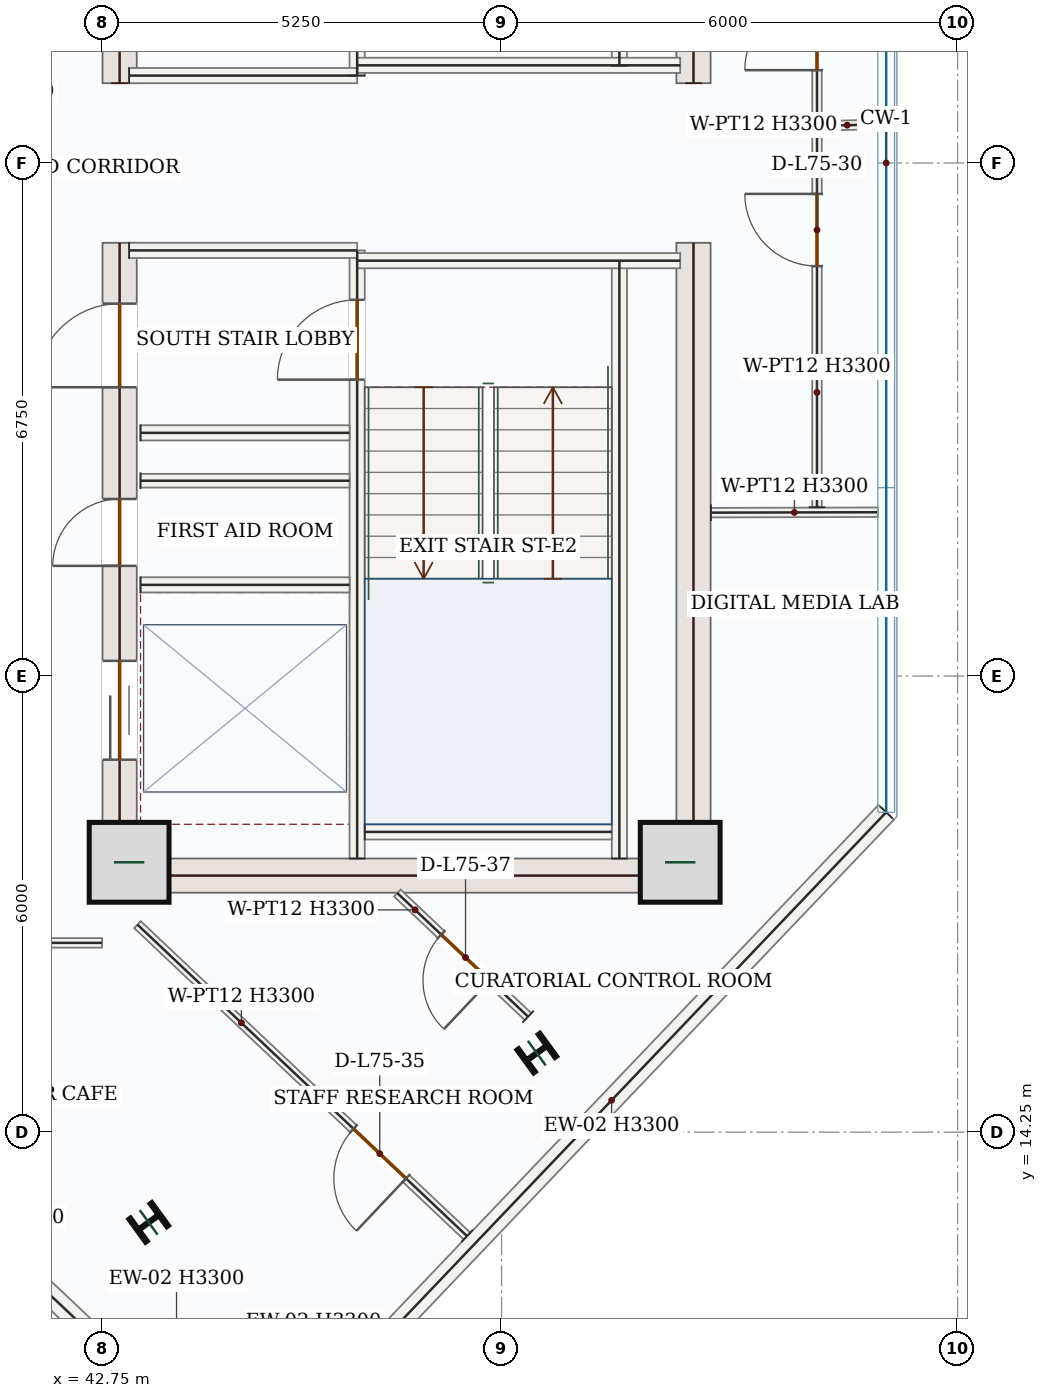
"""IFC4 building model, lengths in metres.
Left out: names, types, materials, properties, quantities, classifications, styles, units other than length and angle.
Written with IfcOpenShell. Run it as: python <this file> out.ifc"""

import sys

from ifc_helpers import new_model, si_unit, direction, frame, frame_2d, origin, origin_2d, place, context, subcontext, project, spatial, rectangle, i_section, extrude, source, transform, mapped, element, fill, save


model = new_model("IFC4")
c1 = context("Model", 3, precision=1e-05, world=origin(), true_north=direction((0.0, 1.0)))
c2 = subcontext(c1, "Body", "Model", "MODEL_VIEW")
j1 = project(units=[si_unit("LENGTHUNIT", "METRE"), si_unit("PLANEANGLEUNIT", "RADIAN")], contexts=[c1])
p1 = place(None, origin())
s1 = spatial("IfcSite", under=j1, at=p1, CompositionType="ELEMENT")
p2 = place(p1, origin())
s2 = spatial("IfcBuilding", under=s1, at=p2, CompositionType="ELEMENT")
p3 = place(p2, frame((0.0, 0.0, 310.35)))
s3 = spatial("IfcBuildingStorey", under=s2, at=p3, CompositionType="ELEMENT", Elevation=310.35)
p4 = place(p3, frame((42.975, 17.4, 0.0), z_axis=(0.0, 0.0, 1.0), x_axis=(0.0, 1.0, 0.0)))
e1 = element("IfcWall", 1, at=p4, inside=s3, PredefinedType="SHEAR", context=c2, shape_type="SweptSolid", body=[
    extrude(rectangle(XDim=8.55, YDim=0.45, at=frame_2d((4.275, 0.0))), origin(), (0.0, 0.0, 1.0), 3.3),
])
p5 = place(p4, frame((6.65, 0.0, 0.0)))
e2 = element("IfcOpeningElement", 2, at=p5, cuts=e1, PredefinedType="OPENING", context=c2, shape_type="SweptSolid", body=[
    extrude(rectangle(XDim=1.1, YDim=2.2, at=frame_2d((0.55, 1.1))), frame((0.0, 0.235, 0.0), z_axis=(0.0, -1.0, 0.0), x_axis=(1.0, 0.0, 0.0)), (0.0, 0.0, 1.0), 0.47),
])
p6 = place(p4, frame((1.75, 0.0, 0.0)))
e3 = element("IfcOpeningElement", 3, at=p6, cuts=e1, PredefinedType="OPENING", context=c2, shape_type="SweptSolid", body=[
    extrude(rectangle(XDim=1.3, YDim=2.2, at=frame_2d((0.65, 1.1))), frame((0.0, 0.235, 0.0), z_axis=(0.0, -1.0, 0.0), x_axis=(1.0, 0.0, 0.0)), (0.0, 0.0, 1.0), 0.47),
])
p7 = place(p4, frame((4.3, 0.0, 0.0)))
e4 = element("IfcOpeningElement", 4, at=p7, cuts=e1, PredefinedType="OPENING", context=c2, shape_type="SweptSolid", body=[
    extrude(rectangle(XDim=0.88, YDim=2.1, at=frame_2d((0.44, 1.05))), frame((0.0, 0.235, 0.0), z_axis=(0.0, -1.0, 0.0), x_axis=(1.0, 0.0, 0.0)), (0.0, 0.0, 1.0), 0.47),
])
p8 = place(p3, frame((42.975, 28.05, 0.0), z_axis=(0.0, 0.0, 1.0), x_axis=(0.0, 1.0, 0.0)))
e5 = element("IfcWall", 5, at=p8, inside=s3, PredefinedType="SHEAR", context=c2, shape_type="SweptSolid", body=[
    extrude(rectangle(XDim=8.55, YDim=0.45, at=frame_2d((4.275, 0.0))), origin(), (0.0, 0.0, 1.0), 3.3),
])
p9 = place(p8, frame((1.5, 0.0, 0.0)))
e6 = element("IfcOpeningElement", 6, at=p9, cuts=e5, PredefinedType="OPENING", context=c2, shape_type="SweptSolid", body=[
    extrude(rectangle(XDim=1.1, YDim=2.2, at=frame_2d((0.55, 1.1))), frame((0.0, 0.235, 0.0), z_axis=(0.0, -1.0, 0.0), x_axis=(1.0, 0.0, 0.0)), (0.0, 0.0, 1.0), 0.47),
])
m1 = source(origin(), c2, "Body", "SweptSolid", [
    extrude(rectangle(XDim=8.55, YDim=0.45, at=frame_2d((4.275, 0.0))), origin(), (0.0, 0.0, 1.0), 3.3),
])
for number, where, z_axis, x_axis in (
    (7, (50.525, 17.4, 0.0), (0.0, 0.0, 1.0), (0.0, 1.0, 0.0)),
    (8, (50.525, 28.05, 0.0), (0.0, 0.0, 1.0), (0.0, 1.0, 0.0)),
):
    element("IfcWall", number, at=place(p3, frame(where, z_axis=z_axis, x_axis=x_axis)), inside=s3, PredefinedType="SHEAR", context=c2, shape_type="MappedRepresentation", body=[
        mapped(m1, transform((0.0, 0.0, 0.0), x_axis=(1.0, 0.0, 0.0), y_axis=(0.0, 1.0, 0.0), z_axis=(0.0, 0.0, 1.0), scale=1.0)),
    ])
m2 = source(origin(), c2, "Body", "SweptSolid", [
    extrude(rectangle(XDim=7.1, YDim=0.45, at=frame_2d((3.55, 0.0))), origin(), (0.0, 0.0, 1.0), 3.3),
])
p10 = place(p3, frame((43.2, 17.625, 0.0), z_axis=(0.0, 0.0, 1.0), x_axis=(1.0, 0.0, 0.0)))
e9 = element("IfcWall", 9, at=p10, inside=s3, PredefinedType="SHEAR", context=c2, shape_type="MappedRepresentation", body=[
    mapped(m2, transform((0.0, 0.0, 0.0), x_axis=(1.0, 0.0, 0.0), y_axis=(0.0, 1.0, 0.0), z_axis=(0.0, 0.0, 1.0), scale=1.0)),
])
m3 = source(origin(), c2, "Body", "SweptSolid", [
    extrude(rectangle(XDim=1.05, YDim=1.05, at=origin_2d()), origin(), (0.0, 0.0, 1.0), 3.75),
])
for number, where, z_axis, x_axis in (
    (10, (43.1, 17.8, 0.0), (0.0, 0.0, 1.0), (1.0, 0.0, 0.0)),
    (11, (50.35, 17.8, 0.0), (0.0, 0.0, 1.0), (1.0, 0.0, 0.0)),
):
    element("IfcColumn", number, at=place(p3, frame(where, z_axis=z_axis, x_axis=x_axis)), inside=s3, PredefinedType="COLUMN", context=c2, shape_type="MappedRepresentation", body=[
        mapped(m3, transform((0.0, 0.0, 0.0), x_axis=(1.0, 0.0, 0.0), y_axis=(0.0, 1.0, 0.0), z_axis=(0.0, 0.0, 1.0), scale=1.0)),
    ])
m4 = source(origin(), c2, "Body", "SweptSolid", [
    extrude(i_section(OverallWidth=0.374, OverallDepth=0.372, WebThickness=0.016, FlangeThickness=0.026, FilletRadius=0.018, at=origin_2d()), origin(), (0.0, 0.0, 1.0), 3.75),
])
for number, where, z_axis, x_axis in (
    (12, (43.357, 13.063, 0.0), (0.0, 0.0, 1.0), (-0.588, 0.809, 0.0)),
    (13, (48.464, 15.289, 0.0), (0.0, 0.0, 1.0), (-0.588, 0.809, 0.0)),
):
    element("IfcColumn", number, at=place(p3, frame(where, z_axis=z_axis, x_axis=x_axis)), inside=s3, PredefinedType="COLUMN", context=c2, shape_type="MappedRepresentation", body=[
        mapped(m4, transform((0.0, 0.0, 0.0), x_axis=(1.0, 0.0, 0.0), y_axis=(0.0, 1.0, 0.0), z_axis=(0.0, 0.0, 1.0), scale=1.0)),
    ])
m5 = source(origin(), c2, "Body", "SweptSolid", [
    extrude(rectangle(XDim=10.47, YDim=0.28, at=frame_2d((5.235, 0.0))), origin(), (0.0, 0.0, 1.0), 3.3),
])
p11 = place(p3, frame((53.06, 18.458, 0.0), z_axis=(0.0, 0.0, 1.0), x_axis=(-0.690070788875, -0.723741878256, 0.0)))
e14 = element("IfcWall", 14, at=p11, inside=s3, PredefinedType="SOLIDWALL", context=c2, shape_type="MappedRepresentation", body=[
    mapped(m5, transform((0.0, 0.0, 0.0), x_axis=(1.0, 0.0, 0.0), y_axis=(0.0, 1.0, 0.0), z_axis=(0.0, 0.0, 1.0), scale=1.0)),
])
m6 = source(origin(), c2, "Body", "SweptSolid", [
    extrude(rectangle(XDim=5.718, YDim=0.28, at=frame_2d((2.859, 0.0))), origin(), (0.0, 0.0, 1.0), 3.3),
])
p12 = place(p3, frame((43.432, 10.812, 0.0), z_axis=(0.0, 0.0, 1.0), x_axis=(-0.726765623086, 0.686885528382, 0.0)))
e15 = element("IfcWall", 15, at=p12, inside=s3, PredefinedType="SOLIDWALL", context=c2, shape_type="MappedRepresentation", body=[
    mapped(m6, transform((0.0, 0.0, 0.0), x_axis=(1.0, 0.0, 0.0), y_axis=(0.0, 1.0, 0.0), z_axis=(0.0, 0.0, 1.0), scale=1.0)),
])
m7 = source(origin(), c2, "Body", "SweptSolid", [
    extrude(rectangle(XDim=7.87, YDim=0.2, at=frame_2d((3.935, 0.0))), origin(), (0.0, 0.0, 1.0), 3.3),
])
for number, where, z_axis, x_axis in (
    (16, (49.55, 17.85, 0.0), (0.0, 0.0, 1.0), (0.0, 1.0, 0.0)),
    (17, (49.55, 28.28, 0.0), (0.0, 0.0, 1.0), (0.0, 1.0, 0.0)),
):
    element("IfcWall", number, at=place(p3, frame(where, z_axis=z_axis, x_axis=x_axis)), inside=s3, PredefinedType="SOLIDWALL", context=c2, shape_type="MappedRepresentation", body=[
        mapped(m7, transform((0.0, 0.0, 0.0), x_axis=(1.0, 0.0, 0.0), y_axis=(0.0, 1.0, 0.0), z_axis=(0.0, 0.0, 1.0), scale=1.0)),
    ])
p13 = place(p3, frame((46.1, 17.85, 0.0), z_axis=(0.0, 0.0, 1.0), x_axis=(0.0, 1.0, 0.0)))
e18 = element("IfcWall", 18, at=p13, inside=s3, PredefinedType="SOLIDWALL", context=c2, shape_type="SweptSolid", body=[
    extrude(rectangle(XDim=8.0, YDim=0.2, at=frame_2d((4.0, 0.0))), origin(), (0.0, 0.0, 1.0), 3.3),
])
p14 = place(p13, frame((6.3, 0.0, 0.0)))
e19 = element("IfcOpeningElement", 19, at=p14, cuts=e18, PredefinedType="OPENING", context=c2, shape_type="SweptSolid", body=[
    extrude(rectangle(XDim=1.05, YDim=2.15, at=frame_2d((0.525, 1.075))), frame((0.0, 0.11, 0.0), z_axis=(0.0, -1.0, 0.0), x_axis=(1.0, 0.0, 0.0)), (0.0, 0.0, 1.0), 0.22),
])
p15 = place(p3, frame((46.1, 28.15, 0.0), z_axis=(0.0, 0.0, 1.0), x_axis=(0.0, 1.0, 0.0)))
e20 = element("IfcWall", 20, at=p15, inside=s3, PredefinedType="SOLIDWALL", context=c2, shape_type="SweptSolid", body=[
    extrude(rectangle(XDim=8.0, YDim=0.2, at=frame_2d((4.0, 0.0))), origin(), (0.0, 0.0, 1.0), 3.3),
])
p16 = place(p15, frame((0.4, 0.0, 0.0)))
e21 = element("IfcOpeningElement", 21, at=p16, cuts=e20, PredefinedType="OPENING", context=c2, shape_type="SweptSolid", body=[
    extrude(rectangle(XDim=1.05, YDim=2.15, at=frame_2d((0.525, 1.075))), frame((0.0, 0.11, 0.0), z_axis=(0.0, -1.0, 0.0), x_axis=(1.0, 0.0, 0.0)), (0.0, 0.0, 1.0), 0.22),
])
m8 = source(origin(), c2, "Body", "SweptSolid", [
    extrude(rectangle(XDim=3.0, YDim=0.2, at=frame_2d((1.5, 0.0))), origin(), (0.0, 0.0, 1.0), 3.3),
])
p17 = place(p3, frame((43.1, 25.85, 0.0), z_axis=(0.0, 0.0, 1.0), x_axis=(1.0, 0.0, 0.0)))
e22 = element("IfcWall", 22, at=p17, inside=s3, PredefinedType="SOLIDWALL", context=c2, shape_type="MappedRepresentation", body=[
    mapped(m8, transform((0.0, 0.0, 0.0), x_axis=(1.0, 0.0, 0.0), y_axis=(0.0, 1.0, 0.0), z_axis=(0.0, 0.0, 1.0), scale=1.0)),
])
m9 = source(origin(), c2, "Body", "SweptSolid", [
    extrude(rectangle(XDim=4.25, YDim=0.2, at=frame_2d((2.125, 0.0))), origin(), (0.0, 0.0, 1.0), 3.3),
])
p18 = place(p3, frame((46.1, 25.715, 0.0), z_axis=(0.0, 0.0, 1.0), x_axis=(1.0, 0.0, 0.0)))
e23 = element("IfcWall", 23, at=p18, inside=s3, PredefinedType="SOLIDWALL", context=c2, shape_type="MappedRepresentation", body=[
    mapped(m9, transform((0.0, 0.0, 0.0), x_axis=(1.0, 0.0, 0.0), y_axis=(0.0, 1.0, 0.0), z_axis=(0.0, 0.0, 1.0), scale=1.0)),
])
p19 = place(p3, frame((43.1, 28.15, 0.0), z_axis=(0.0, 0.0, 1.0), x_axis=(1.0, 0.0, 0.0)))
e24 = element("IfcWall", 24, at=p19, inside=s3, PredefinedType="SOLIDWALL", context=c2, shape_type="MappedRepresentation", body=[
    mapped(m8, transform((0.0, 0.0, 0.0), x_axis=(1.0, 0.0, 0.0), y_axis=(0.0, 1.0, 0.0), z_axis=(0.0, 0.0, 1.0), scale=1.0)),
])
p20 = place(p3, frame((46.1, 28.285, 0.0), z_axis=(0.0, 0.0, 1.0), x_axis=(1.0, 0.0, 0.0)))
e25 = element("IfcWall", 25, at=p20, inside=s3, PredefinedType="SOLIDWALL", context=c2, shape_type="MappedRepresentation", body=[
    mapped(m9, transform((0.0, 0.0, 0.0), x_axis=(1.0, 0.0, 0.0), y_axis=(0.0, 1.0, 0.0), z_axis=(0.0, 0.0, 1.0), scale=1.0)),
])
m10 = source(origin(), c2, "Body", "SweptSolid", [
    extrude(rectangle(XDim=3.25, YDim=0.2, at=frame_2d((1.625, 0.0))), origin(), (0.0, 0.0, 1.0), 3.3),
])
p21 = place(p3, frame((46.2, 18.2, 0.0), z_axis=(0.0, 0.0, 1.0), x_axis=(1.0, 0.0, 0.0)))
e26 = element("IfcWall", 26, at=p21, inside=s3, PredefinedType="SOLIDWALL", context=c2, shape_type="MappedRepresentation", body=[
    mapped(m10, transform((0.0, 0.0, 0.0), x_axis=(1.0, 0.0, 0.0), y_axis=(0.0, 1.0, 0.0), z_axis=(0.0, 0.0, 1.0), scale=1.0)),
])
m11 = source(origin(), c2, "Body", "SweptSolid", [
    extrude(rectangle(XDim=2.75, YDim=0.2, at=frame_2d((1.375, 0.0))), origin(), (0.0, 0.0, 1.0), 3.3),
])
for number, where, z_axis, x_axis in (
    (27, (43.25, 23.45, 0.0), (0.0, 0.0, 1.0), (1.0, 0.0, 0.0)),
    (28, (43.25, 21.45, 0.0), (0.0, 0.0, 1.0), (1.0, 0.0, 0.0)),
):
    element("IfcWall", number, at=place(p3, frame(where, z_axis=z_axis, x_axis=x_axis)), inside=s3, PredefinedType="SOLIDWALL", context=c2, shape_type="MappedRepresentation", body=[
        mapped(m11, transform((0.0, 0.0, 0.0), x_axis=(1.0, 0.0, 0.0), y_axis=(0.0, 1.0, 0.0), z_axis=(0.0, 0.0, 1.0), scale=1.0)),
    ])
m12 = source(origin(), c2, "Body", "SweptSolid", [
    extrude(rectangle(XDim=2.75, YDim=0.18, at=frame_2d((1.375, 0.0))), origin(), (0.0, 0.0, 1.0), 3.3),
])
p22 = place(p3, frame((43.25, 22.82, 0.0), z_axis=(0.0, 0.0, 1.0), x_axis=(1.0, 0.0, 0.0)))
e29 = element("IfcWall", 29, at=p22, inside=s3, PredefinedType="PARTITIONING", context=c2, shape_type="MappedRepresentation", body=[
    mapped(m12, transform((0.0, 0.0, 0.0), x_axis=(1.0, 0.0, 0.0), y_axis=(0.0, 1.0, 0.0), z_axis=(0.0, 0.0, 1.0), scale=1.0)),
])
p23 = place(p3, frame((48.349, 15.769, 0.0), z_axis=(0.0, 0.0, 1.0), x_axis=(-0.726735597886, 0.686917295433, 0.0)))
e30 = element("IfcWall", 30, at=p23, inside=s3, PredefinedType="PARTITIONING", context=c2, shape_type="SweptSolid", body=[
    extrude(rectangle(XDim=2.367, YDim=0.125, at=frame_2d((1.183, 0.0))), origin(), (0.0, 0.0, 1.0), 3.3),
])
p24 = place(p23, frame((0.692, 0.0, 0.0)))
e31 = element("IfcOpeningElement", 31, at=p24, cuts=e30, PredefinedType="OPENING", context=c2, shape_type="SweptSolid", body=[
    extrude(rectangle(XDim=0.88, YDim=2.1, at=frame_2d((0.44, 1.05))), frame((0.0, 0.073, 0.0), z_axis=(0.0, -1.0, 0.0), x_axis=(1.0, 0.0, 0.0)), (0.0, 0.0, 1.0), 0.145),
])
p25 = place(p3, frame((47.544, 12.883, 0.0), z_axis=(0.0, 0.0, 1.0), x_axis=(-0.726761082497, 0.686890332562, 0.0)))
e32 = element("IfcWall", 32, at=p25, inside=s3, PredefinedType="PARTITIONING", context=c2, shape_type="SweptSolid", body=[
    extrude(rectangle(XDim=5.964, YDim=0.125, at=frame_2d((2.982, 0.0))), origin(), (0.0, 0.0, 1.0), 3.3),
])
p26 = place(p25, frame((1.103, 0.0, 0.0)))
e33 = element("IfcOpeningElement", 33, at=p26, cuts=e32, PredefinedType="OPENING", context=c2, shape_type="SweptSolid", body=[
    extrude(rectangle(XDim=0.95, YDim=2.15, at=frame_2d((0.475, 1.075))), frame((0.0, 0.073, 0.0), z_axis=(0.0, -1.0, 0.0), x_axis=(1.0, 0.0, 0.0)), (0.0, 0.0, 1.0), 0.145),
])
m13 = source(origin(), c2, "Body", "SweptSolid", [
    extrude(rectangle(XDim=2.195, YDim=0.125, at=frame_2d((1.098, 0.0))), origin(), (0.0, 0.0, 1.0), 3.3),
])
p27 = place(p3, frame((50.755, 22.4, 0.0), z_axis=(0.0, 0.0, 1.0), x_axis=(0.999997006375, 0.002446884011, 0.0)))
e34 = element("IfcWall", 34, at=p27, inside=s3, PredefinedType="PARTITIONING", context=c2, shape_type="MappedRepresentation", body=[
    mapped(m13, transform((0.0, 0.0, 0.0), x_axis=(1.0, 0.0, 0.0), y_axis=(0.0, 1.0, 0.0), z_axis=(0.0, 0.0, 1.0), scale=1.0)),
])
p28 = place(p3, frame((52.149, 22.471, 0.0), z_axis=(0.0, 0.0, 1.0), x_axis=(9.7318865e-05, 0.999999995265, 0.0)))
e35 = element("IfcWall", 35, at=p28, inside=s3, PredefinedType="PARTITIONING", context=c2, shape_type="SweptSolid", body=[
    extrude(rectangle(XDim=5.017, YDim=0.125, at=frame_2d((2.509, 0.0))), origin(), (0.0, 0.0, 1.0), 3.3),
])
p29 = place(p28, frame((3.173, 0.0, 0.0)))
e36 = element("IfcOpeningElement", 36, at=p29, cuts=e35, PredefinedType="OPENING", context=c2, shape_type="SweptSolid", body=[
    extrude(rectangle(XDim=0.95, YDim=2.15, at=frame_2d((0.475, 1.075))), frame((0.0, 0.073, 0.0), z_axis=(0.0, -1.0, 0.0), x_axis=(1.0, 0.0, 0.0)), (0.0, 0.0, 1.0), 0.145),
])
m14 = source(origin(), c2, "Body", "SweptSolid", [
    extrude(rectangle(XDim=0.795, YDim=0.125, at=frame_2d((0.398, 0.0))), origin(), (0.0, 0.0, 1.0), 3.3),
])
p30 = place(p3, frame((52.15, 27.488, 0.0), z_axis=(0.0, 0.0, 1.0), x_axis=(0.999727865024, 0.023328006675, 0.0)))
e37 = element("IfcWall", 37, at=p30, inside=s3, PredefinedType="PARTITIONING", context=c2, shape_type="MappedRepresentation", body=[
    mapped(m14, transform((0.0, 0.0, 0.0), x_axis=(1.0, 0.0, 0.0), y_axis=(0.0, 1.0, 0.0), z_axis=(0.0, 0.0, 1.0), scale=1.0)),
])
p31 = place(p3, frame((52.15, 27.556, 0.0), z_axis=(0.0, 0.0, 1.0), x_axis=(-0.000245639885, 0.999999969831, 0.0)))
e38 = element("IfcWall", 38, at=p31, inside=s3, PredefinedType="PARTITIONING", context=c2, shape_type="SweptSolid", body=[
    extrude(rectangle(XDim=3.976, YDim=0.125, at=frame_2d((1.988, 0.0))), origin(), (0.0, 0.0, 1.0), 3.3),
])
p32 = place(p31, frame((0.666, 0.0, 0.0)))
e39 = element("IfcOpeningElement", 39, at=p32, cuts=e38, PredefinedType="OPENING", context=c2, shape_type="SweptSolid", body=[
    extrude(rectangle(XDim=0.95, YDim=2.15, at=frame_2d((0.475, 1.075))), frame((0.0, 0.073, 0.0), z_axis=(0.0, -1.0, 0.0), x_axis=(1.0, 0.0, 0.0)), (0.0, 0.0, 1.0), 0.145),
])
p33 = place(p3, frame((36.28, 16.74, 0.0), z_axis=(0.0, 0.0, 1.0), x_axis=(1.0, 0.0, 0.0)))
e40 = element("IfcWall", 40, at=p33, inside=s3, PredefinedType="PARTITIONING", context=c2, shape_type="SweptSolid", body=[
    extrude(rectangle(XDim=6.464, YDim=0.125, at=frame_2d((3.232, 0.0))), origin(), (0.0, 0.0, 1.0), 3.3),
])
p34 = place(p33, frame((1.213, 0.0, 0.0)))
e41 = element("IfcOpeningElement", 41, at=p34, cuts=e40, PredefinedType="OPENING", context=c2, shape_type="SweptSolid", body=[
    extrude(rectangle(XDim=0.95, YDim=2.15, at=frame_2d((0.475, 1.075))), frame((0.0, 0.073, 0.0), z_axis=(0.0, -1.0, 0.0), x_axis=(1.0, 0.0, 0.0)), (0.0, 0.0, 1.0), 0.145),
])
m15 = source(origin(), c2, "Body", "SweptSolid", [
    extrude(rectangle(XDim=1.05, YDim=2.15, at=frame_2d((0.525, 1.075))), frame((0.0, 0.025, 0.0), z_axis=(0.0, -1.0, 0.0), x_axis=(1.0, 0.0, 0.0)), (0.0, 0.0, 1.0), 0.05),
])
p35 = place(p14, origin())
e42 = element("IfcDoor", 42, at=p35, inside=s3, OperationType="SINGLE_SWING_LEFT", PredefinedType="DOOR", context=c2, shape_type="MappedRepresentation", body=[
    mapped(m15, transform((0.0, 0.0, 0.0), x_axis=(1.0, 0.0, 0.0), y_axis=(0.0, 1.0, 0.0), z_axis=(0.0, 0.0, 1.0), scale=1.0)),
])
fill(e19, e42)
m16 = source(origin(), c2, "Body", "SweptSolid", [
    extrude(rectangle(XDim=1.1, YDim=2.2, at=frame_2d((0.55, 1.1))), frame((0.0, 0.025, 0.0), z_axis=(0.0, -1.0, 0.0), x_axis=(1.0, 0.0, 0.0)), (0.0, 0.0, 1.0), 0.05),
])
p36 = place(p5, origin())
e43 = element("IfcDoor", 43, at=p36, inside=s3, OperationType="SINGLE_SWING_LEFT", PredefinedType="DOOR", context=c2, shape_type="MappedRepresentation", body=[
    mapped(m16, transform((0.0, 0.0, 0.0), x_axis=(1.0, 0.0, 0.0), y_axis=(0.0, 1.0, 0.0), z_axis=(0.0, 0.0, 1.0), scale=1.0)),
])
fill(e2, e43)
m17 = source(origin(), c2, "Body", "SweptSolid", [
    extrude(rectangle(XDim=1.3, YDim=2.2, at=frame_2d((0.65, 1.1))), frame((0.0, 0.025, 0.0), z_axis=(0.0, -1.0, 0.0), x_axis=(1.0, 0.0, 0.0)), (0.0, 0.0, 1.0), 0.05),
])
p37 = place(p6, origin())
e44 = element("IfcDoor", 44, at=p37, inside=s3, OperationType="DOUBLE_DOOR_SLIDING", PredefinedType="DOOR", context=c2, shape_type="MappedRepresentation", body=[
    mapped(m17, transform((0.0, 0.0, 0.0), x_axis=(1.0, 0.0, 0.0), y_axis=(0.0, 1.0, 0.0), z_axis=(0.0, 0.0, 1.0), scale=1.0)),
])
fill(e3, e44)
m18 = source(origin(), c2, "Body", "SweptSolid", [
    extrude(rectangle(XDim=0.88, YDim=2.1, at=frame_2d((0.44, 1.05))), frame((0.0, 0.025, 0.0), z_axis=(0.0, -1.0, 0.0), x_axis=(1.0, 0.0, 0.0)), (0.0, 0.0, 1.0), 0.05),
])
p38 = place(p7, origin())
e45 = element("IfcDoor", 45, at=p38, inside=s3, OperationType="SINGLE_SWING_LEFT", PredefinedType="DOOR", context=c2, shape_type="MappedRepresentation", body=[
    mapped(m18, transform((0.0, 0.0, 0.0), x_axis=(1.0, 0.0, 0.0), y_axis=(0.0, 1.0, 0.0), z_axis=(0.0, 0.0, 1.0), scale=1.0)),
])
fill(e4, e45)
m19 = source(origin(), c2, "Body", "SweptSolid", [
    extrude(rectangle(XDim=0.95, YDim=2.15, at=frame_2d((0.475, 1.075))), frame((0.0, 0.025, 0.0), z_axis=(0.0, -1.0, 0.0), x_axis=(1.0, 0.0, 0.0)), (0.0, 0.0, 1.0), 0.05),
])
p39 = place(p32, origin())
e46 = element("IfcDoor", 46, at=p39, inside=s3, OperationType="SINGLE_SWING_LEFT", PredefinedType="DOOR", context=c2, shape_type="MappedRepresentation", body=[
    mapped(m19, transform((0.0, 0.0, 0.0), x_axis=(1.0, 0.0, 0.0), y_axis=(0.0, 1.0, 0.0), z_axis=(0.0, 0.0, 1.0), scale=1.0)),
])
fill(e39, e46)
p40 = place(p29, origin())
e47 = element("IfcDoor", 47, at=p40, inside=s3, OperationType="SINGLE_SWING_RIGHT", PredefinedType="DOOR", context=c2, shape_type="MappedRepresentation", body=[
    mapped(m19, transform((0.0, 0.0, 0.0), x_axis=(1.0, 0.0, 0.0), y_axis=(0.0, 1.0, 0.0), z_axis=(0.0, 0.0, 1.0), scale=1.0)),
])
fill(e36, e47)
p41 = place(p26, origin())
e48 = element("IfcDoor", 48, at=p41, inside=s3, OperationType="SINGLE_SWING_LEFT", PredefinedType="DOOR", context=c2, shape_type="MappedRepresentation", body=[
    mapped(m19, transform((0.0, 0.0, 0.0), x_axis=(1.0, 0.0, 0.0), y_axis=(0.0, 1.0, 0.0), z_axis=(0.0, 0.0, 1.0), scale=1.0)),
])
fill(e33, e48)
p42 = place(p24, origin())
e49 = element("IfcDoor", 49, at=p42, inside=s3, OperationType="SINGLE_SWING_LEFT", PredefinedType="DOOR", context=c2, shape_type="MappedRepresentation", body=[
    mapped(m18, transform((0.0, 0.0, 0.0), x_axis=(1.0, 0.0, 0.0), y_axis=(0.0, 1.0, 0.0), z_axis=(0.0, 0.0, 1.0), scale=1.0)),
])
fill(e31, e49)
save(model, sys.argv[1])
